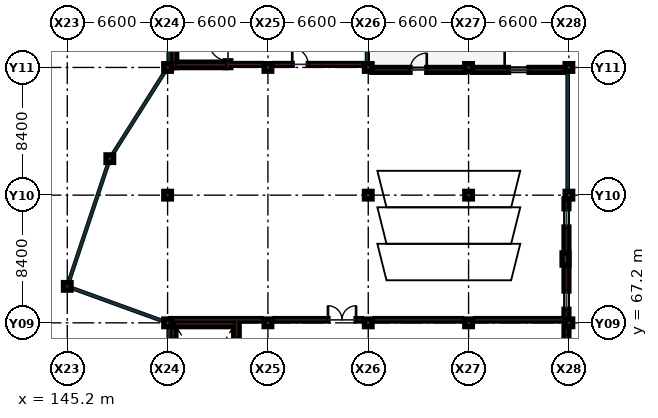
"""IFC4 building model, lengths in metres.
Left out: names, types, materials, properties, quantities, classifications, styles, units other than length and angle.
Written with IfcOpenShell. Run it as: python <this file> out.ifc"""

import sys

from ifc_helpers import new_model, si_unit, direction, frame, frame_2d, origin, origin_2d, place, context, subcontext, project, spatial, rectangle, extrude, element, fill, save


model = new_model("IFC4")
c1 = context("Model", 3, precision=1e-05, world=origin(), true_north=direction((0.0, 1.0)))
c2 = subcontext(c1, "Body", "Model", "MODEL_VIEW")
j1 = project(units=[si_unit("LENGTHUNIT", "METRE"), si_unit("PLANEANGLEUNIT", "RADIAN")], contexts=[c1])
p1 = place(None, origin())
s1 = spatial("IfcSite", under=j1, at=p1, CompositionType="ELEMENT")
p2 = place(p1, origin())
s2 = spatial("IfcBuilding", under=s1, at=p2, CompositionType="ELEMENT")
p3 = place(p2, frame((0.0, 0.0, 9.9)))
s3 = spatial("IfcBuildingStorey", under=s2, at=p3, CompositionType="ELEMENT", Elevation=9.9)
for number, where, z_axis, x_axis in (
    (1, (151.8, 67.2, 0.0), (0.0, 0.0, 1.0), (1.0, 0.0, 0.0)),
    (2, (151.8, 75.6, 0.0), (0.0, 0.0, 1.0), (1.0, 0.0, 0.0)),
    (3, (151.8, 84.0, 0.0), (0.0, 0.0, 1.0), (1.0, 0.0, 0.0)),
    (4, (158.4, 67.2, 0.0), (0.0, 0.0, 1.0), (1.0, 0.0, 0.0)),
    (5, (158.4, 84.0, 0.0), (0.0, 0.0, 1.0), (1.0, 0.0, 0.0)),
    (6, (165.0, 67.2, 0.0), (0.0, 0.0, 1.0), (1.0, 0.0, 0.0)),
    (7, (165.0, 75.6, 0.0), (0.0, 0.0, 1.0), (1.0, 0.0, 0.0)),
    (8, (165.0, 84.0, 0.0), (0.0, 0.0, 1.0), (1.0, 0.0, 0.0)),
    (9, (171.6, 67.2, 0.0), (0.0, 0.0, 1.0), (1.0, 0.0, 0.0)),
    (10, (171.6, 75.6, 0.0), (0.0, 0.0, 1.0), (1.0, 0.0, 0.0)),
    (11, (171.6, 84.0, 0.0), (0.0, 0.0, 1.0), (1.0, 0.0, 0.0)),
    (12, (178.2, 67.2, 0.0), (0.0, 0.0, 1.0), (1.0, 0.0, 0.0)),
    (13, (178.2, 75.6, 0.0), (0.0, 0.0, 1.0), (1.0, 0.0, 0.0)),
    (14, (178.2, 84.0, 0.0), (0.0, 0.0, 1.0), (1.0, 0.0, 0.0)),
    (15, (145.2, 69.6, 0.0), (0.0, 0.0, 1.0), (1.0, 0.0, 0.0)),
    (16, (148.0, 78.0, 0.0), (0.0, 0.0, 1.0), (1.0, 0.0, 0.0)),
):
    element("IfcColumn", number, at=place(p3, frame(where, z_axis=z_axis, x_axis=x_axis)), inside=s3, PredefinedType="COLUMN", context=c2, shape_type="SweptSolid", body=[
        extrude(rectangle(XDim=0.5, YDim=0.5, at=origin_2d()), origin(), (0.0, 0.0, 1.0), 4.5),
    ])
p4 = place(p3, frame((177.975, 71.4, 0.0), z_axis=(0.0, 0.0, 1.0), x_axis=(1.0, 0.0, 0.0)))
e17 = element("IfcColumn", 17, at=p4, inside=s3, PredefinedType="PILASTER", context=c2, shape_type="SweptSolid", body=[
    extrude(rectangle(XDim=0.45, YDim=0.8, at=origin_2d()), origin(), (0.0, 0.0, 1.0), 4.5),
])
p5 = place(p3, frame((152.0, 67.4, 0.0), z_axis=(0.0, 0.0, 1.0), x_axis=(1.0, 0.0, 0.0)))
e18 = element("IfcWall", 18, at=p5, inside=s3, PredefinedType="PARTITIONING", context=c2, shape_type="SweptSolid", body=[
    extrude(rectangle(XDim=5.95, YDim=0.16, at=frame_2d((2.975, 0.0))), origin(), (0.0, 0.0, 1.0), 3.49),
])
p6 = place(p3, frame((158.85, 67.4, 0.0), z_axis=(0.0, 0.0, 1.0), x_axis=(1.0, 0.0, 0.0)))
e19 = element("IfcWall", 19, at=p6, inside=s3, PredefinedType="PARTITIONING", context=c2, shape_type="SweptSolid", body=[
    extrude(rectangle(XDim=5.7, YDim=0.16, at=frame_2d((2.85, 0.0))), origin(), (0.0, 0.0, 1.0), 3.49),
])
p7 = place(p6, frame((3.5, 0.0, 0.0)))
e20 = element("IfcOpeningElement", 20, at=p7, cuts=e19, PredefinedType="OPENING", context=c2, shape_type="SweptSolid", body=[
    extrude(rectangle(XDim=1.85, YDim=2.25, at=frame_2d((0.925, 1.125))), frame((0.0, 0.09, 0.0), z_axis=(0.0, -1.0, 0.0), x_axis=(1.0, 0.0, 0.0)), (0.0, 0.0, 1.0), 0.18),
])
p8 = place(p3, frame((165.45, 67.4, 0.0), z_axis=(0.0, 0.0, 1.0), x_axis=(1.0, 0.0, 0.0)))
e21 = element("IfcWall", 21, at=p8, inside=s3, PredefinedType="PARTITIONING", context=c2, shape_type="SweptSolid", body=[
    extrude(rectangle(XDim=5.7, YDim=0.16, at=frame_2d((2.85, 0.0))), origin(), (0.0, 0.0, 1.0), 3.49),
])
p9 = place(p3, frame((172.05, 67.4, 0.0), z_axis=(0.0, 0.0, 1.0), x_axis=(1.0, 0.0, 0.0)))
e22 = element("IfcWall", 22, at=p9, inside=s3, PredefinedType="PARTITIONING", context=c2, shape_type="SweptSolid", body=[
    extrude(rectangle(XDim=5.83, YDim=0.16, at=frame_2d((2.915, 0.0))), origin(), (0.0, 0.0, 1.0), 3.49),
])
p10 = place(p3, frame((155.8, 84.2, 0.0), z_axis=(0.0, 0.0, 1.0), x_axis=(1.0, 0.0, 0.0)))
e23 = element("IfcWall", 23, at=p10, inside=s3, PredefinedType="PARTITIONING", context=c2, shape_type="SweptSolid", body=[
    extrude(rectangle(XDim=2.15, YDim=0.12, at=frame_2d((1.075, 0.0))), origin(), (0.0, 0.0, 1.0), 3.49),
])
p11 = place(p3, frame((158.85, 84.2, 0.0), z_axis=(0.0, 0.0, 1.0), x_axis=(1.0, 0.0, 0.0)))
e24 = element("IfcWall", 24, at=p11, inside=s3, PredefinedType="PARTITIONING", context=c2, shape_type="SweptSolid", body=[
    extrude(rectangle(XDim=5.83, YDim=0.12, at=frame_2d((2.915, 0.0))), origin(), (0.0, 0.0, 1.0), 3.49),
])
p12 = place(p11, frame((1.15, 0.0, 0.0)))
e25 = element("IfcOpeningElement", 25, at=p12, cuts=e24, PredefinedType="OPENING", context=c2, shape_type="SweptSolid", body=[
    extrude(rectangle(XDim=1.05, YDim=2.15, at=frame_2d((0.525, 1.075))), frame((0.0, 0.07, 0.0), z_axis=(0.0, -1.0, 0.0), x_axis=(1.0, 0.0, 0.0)), (0.0, 0.0, 1.0), 0.14),
])
p13 = place(p3, frame((171.355, 83.84, 0.0), z_axis=(0.0, 0.0, 1.0), x_axis=(-1.0, 0.0, 0.0)))
e26 = element("IfcWall", 26, at=p13, inside=s3, PredefinedType="SOLIDWALL", context=c2, shape_type="SweptSolid", body=[
    extrude(rectangle(XDim=6.11, YDim=0.32, at=frame_2d((3.055, 0.0))), origin(), (0.0, 0.0, 1.0), 3.625),
])
p14 = place(p13, frame((2.505, 0.0, 0.0)))
e27 = element("IfcOpeningElement", 27, at=p14, cuts=e26, PredefinedType="OPENING", context=c2, shape_type="SweptSolid", body=[
    extrude(rectangle(XDim=1.1, YDim=2.2, at=frame_2d((0.55, 1.1))), frame((0.0, 0.17, 0.0), z_axis=(0.0, -1.0, 0.0), x_axis=(1.0, 0.0, 0.0)), (0.0, 0.0, 1.0), 0.34),
])
p15 = place(p3, frame((178.04, 59.195, 0.0), z_axis=(0.0, 0.0, 1.0), x_axis=(0.0, 1.0, 0.0)))
e28 = element("IfcWall", 28, at=p15, inside=s3, PredefinedType="SOLIDWALL", context=c2, shape_type="SweptSolid", body=[
    extrude(rectangle(XDim=7.76, YDim=0.32, at=frame_2d((3.88, 0.0))), origin(), (0.0, 0.0, 1.0), 3.625),
])
p16 = place(p15, frame((0.65, 0.0, 0.95)))
e29 = element("IfcOpeningElement", 29, at=p16, cuts=e28, PredefinedType="OPENING", context=c2, shape_type="SweptSolid", body=[
    extrude(rectangle(XDim=1.2, YDim=1.5, at=frame_2d((0.6, 0.75))), frame((0.0, 0.17, 0.0), z_axis=(0.0, -1.0, 0.0), x_axis=(1.0, 0.0, 0.0)), (0.0, 0.0, 1.0), 0.34),
])
p17 = place(p15, frame((5.91, 0.0, 0.95)))
e30 = element("IfcOpeningElement", 30, at=p17, cuts=e28, PredefinedType="OPENING", context=c2, shape_type="SweptSolid", body=[
    extrude(rectangle(XDim=1.2, YDim=1.5, at=frame_2d((0.6, 0.75))), frame((0.0, 0.17, 0.0), z_axis=(0.0, -1.0, 0.0), x_axis=(1.0, 0.0, 0.0)), (0.0, 0.0, 1.0), 0.34),
])
p18 = place(p3, frame((178.04, 67.445, 0.0), z_axis=(0.0, 0.0, 1.0), x_axis=(0.0, 1.0, 0.0)))
e31 = element("IfcWall", 31, at=p18, inside=s3, PredefinedType="SOLIDWALL", context=c2, shape_type="SweptSolid", body=[
    extrude(rectangle(XDim=7.91, YDim=0.32, at=frame_2d((3.955, 0.0))), origin(), (0.0, 0.0, 1.0), 3.625),
])
p19 = place(p18, frame((0.65, 0.0, 0.95)))
e32 = element("IfcOpeningElement", 32, at=p19, cuts=e31, PredefinedType="OPENING", context=c2, shape_type="SweptSolid", body=[
    extrude(rectangle(XDim=1.2, YDim=1.5, at=frame_2d((0.6, 0.75))), frame((0.0, 0.17, 0.0), z_axis=(0.0, -1.0, 0.0), x_axis=(1.0, 0.0, 0.0)), (0.0, 0.0, 1.0), 0.34),
])
p20 = place(p18, frame((6.06, 0.0, 0.95)))
e33 = element("IfcOpeningElement", 33, at=p20, cuts=e31, PredefinedType="OPENING", context=c2, shape_type="SweptSolid", body=[
    extrude(rectangle(XDim=1.2, YDim=1.5, at=frame_2d((0.6, 0.75))), frame((0.0, 0.17, 0.0), z_axis=(0.0, -1.0, 0.0), x_axis=(1.0, 0.0, 0.0)), (0.0, 0.0, 1.0), 0.34),
])
p21 = place(p3, frame((177.955, 83.84, 0.0), z_axis=(0.0, 0.0, 1.0), x_axis=(-1.0, 0.0, 0.0)))
e34 = element("IfcWall", 34, at=p21, inside=s3, PredefinedType="SOLIDWALL", context=c2, shape_type="SweptSolid", body=[
    extrude(rectangle(XDim=6.11, YDim=0.32, at=frame_2d((3.055, 0.0))), origin(), (0.0, 0.0, 1.0), 3.625),
])
p22 = place(p21, frame((2.38, 0.0, 0.95)))
e35 = element("IfcOpeningElement", 35, at=p22, cuts=e34, PredefinedType="OPENING", context=c2, shape_type="SweptSolid", body=[
    extrude(rectangle(XDim=1.35, YDim=1.55, at=frame_2d((0.675, 0.775))), frame((0.0, 0.17, 0.0), z_axis=(0.0, -1.0, 0.0), x_axis=(1.0, 0.0, 0.0)), (0.0, 0.0, 1.0), 0.34),
])
p23 = place(p3, frame((152.17, 58.69, 0.0), z_axis=(0.0, 0.0, 1.0), x_axis=(0.0, 1.0, 0.0)))
e36 = element("IfcWall", 36, at=p23, inside=s3, PredefinedType="SHEAR", context=c2, shape_type="SweptSolid", body=[
    extrude(rectangle(XDim=8.62, YDim=0.36, at=frame_2d((4.31, 0.0))), origin(), (0.0, 0.0, 1.0), 4.24),
])
p24 = place(p3, frame((156.33, 58.69, 0.0), z_axis=(0.0, 0.0, 1.0), x_axis=(0.0, 1.0, 0.0)))
e37 = element("IfcWall", 37, at=p24, inside=s3, PredefinedType="SHEAR", context=c2, shape_type="SweptSolid", body=[
    extrude(rectangle(XDim=8.62, YDim=0.36, at=frame_2d((4.31, 0.0))), origin(), (0.0, 0.0, 1.0), 4.24),
])
p25 = place(p24, frame((0.45, 0.0, 0.0)))
e38 = element("IfcOpeningElement", 38, at=p25, cuts=e37, PredefinedType="OPENING", context=c2, shape_type="SweptSolid", body=[
    extrude(rectangle(XDim=1.25, YDim=2.15, at=frame_2d((0.625, 1.075))), frame((0.0, 0.19, 0.0), z_axis=(0.0, -1.0, 0.0), x_axis=(1.0, 0.0, 0.0)), (0.0, 0.0, 1.0), 0.38),
])
p26 = place(p3, frame((152.35, 67.13, 0.0), z_axis=(0.0, 0.0, 1.0), x_axis=(1.0, 0.0, 0.0)))
e39 = element("IfcWall", 39, at=p26, inside=s3, PredefinedType="SHEAR", context=c2, shape_type="SweptSolid", body=[
    extrude(rectangle(XDim=3.8, YDim=0.36, at=frame_2d((1.9, 0.0))), origin(), (0.0, 0.0, 1.0), 4.24),
])
p27 = place(p3, frame((152.22, 83.99, 0.0), z_axis=(0.0, 0.0, 1.0), x_axis=(0.0, 1.0, 0.0)))
e40 = element("IfcWall", 40, at=p27, inside=s3, PredefinedType="SHEAR", context=c2, shape_type="SweptSolid", body=[
    extrude(rectangle(XDim=8.17, YDim=0.36, at=frame_2d((4.085, 0.0))), origin(), (0.0, 0.0, 1.0), 4.24),
])
p28 = place(p3, frame((155.78, 83.99, 0.0), z_axis=(0.0, 0.0, 1.0), x_axis=(0.0, 1.0, 0.0)))
e41 = element("IfcWall", 41, at=p28, inside=s3, PredefinedType="SHEAR", context=c2, shape_type="SweptSolid", body=[
    extrude(rectangle(XDim=8.17, YDim=0.36, at=frame_2d((4.085, 0.0))), origin(), (0.0, 0.0, 1.0), 4.24),
])
p29 = place(p28, frame((0.45, 0.0, 0.0)))
e42 = element("IfcOpeningElement", 42, at=p29, cuts=e41, PredefinedType="OPENING", context=c2, shape_type="SweptSolid", body=[
    extrude(rectangle(XDim=1.25, YDim=2.15, at=frame_2d((0.625, 1.075))), frame((0.0, 0.19, 0.0), z_axis=(0.0, -1.0, 0.0), x_axis=(1.0, 0.0, 0.0)), (0.0, 0.0, 1.0), 0.38),
])
p30 = place(p3, frame((152.4, 84.17, 0.0), z_axis=(0.0, 0.0, 1.0), x_axis=(1.0, 0.0, 0.0)))
e43 = element("IfcWall", 43, at=p30, inside=s3, PredefinedType="SHEAR", context=c2, shape_type="SweptSolid", body=[
    extrude(rectangle(XDim=3.2, YDim=0.36, at=frame_2d((1.6, 0.0))), origin(), (0.0, 0.0, 1.0), 4.24),
])
p31 = place(p7, origin())
e44 = element("IfcDoor", 44, at=p31, inside=s3, OperationType="DOUBLE_DOOR_SINGLE_SWING", PredefinedType="DOOR", context=c2, shape_type="SweptSolid", body=[
    extrude(rectangle(XDim=1.85, YDim=2.25, at=frame_2d((0.925, 1.125))), frame((0.0, 0.025, 0.0), z_axis=(0.0, -1.0, 0.0), x_axis=(1.0, 0.0, 0.0)), (0.0, 0.0, 1.0), 0.05),
])
fill(e20, e44)
p32 = place(p12, origin())
e45 = element("IfcDoor", 45, at=p32, inside=s3, OperationType="SINGLE_SWING_LEFT", PredefinedType="DOOR", context=c2, shape_type="SweptSolid", body=[
    extrude(rectangle(XDim=1.05, YDim=2.15, at=frame_2d((0.525, 1.075))), frame((0.0, 0.025, 0.0), z_axis=(0.0, -1.0, 0.0), x_axis=(1.0, 0.0, 0.0)), (0.0, 0.0, 1.0), 0.05),
])
fill(e25, e45)
p33 = place(p14, frame((1.1, 0.0, 0.0), z_axis=(0.0, 0.0, 1.0), x_axis=(-1.0, 0.0, 0.0)))
e46 = element("IfcDoor", 46, at=p33, inside=s3, OperationType="SINGLE_SWING_LEFT", PredefinedType="DOOR", context=c2, shape_type="SweptSolid", body=[
    extrude(rectangle(XDim=1.1, YDim=2.2, at=frame_2d((0.55, 1.1))), frame((0.0, 0.025, 0.0), z_axis=(0.0, -1.0, 0.0), x_axis=(1.0, 0.0, 0.0)), (0.0, 0.0, 1.0), 0.05),
])
fill(e27, e46)
p34 = place(p17, origin())
e47 = element("IfcWindow", 47, at=p34, inside=s3, PartitioningType="SINGLE_PANEL", PredefinedType="WINDOW", context=c2, shape_type="SweptSolid", body=[
    extrude(rectangle(XDim=1.2, YDim=1.5, at=frame_2d((0.6, 0.75))), frame((0.0, 0.03, 0.0), z_axis=(0.0, -1.0, 0.0), x_axis=(1.0, 0.0, 0.0)), (0.0, 0.0, 1.0), 0.06),
])
fill(e30, e47)
p35 = place(p19, origin())
e48 = element("IfcWindow", 48, at=p35, inside=s3, PartitioningType="SINGLE_PANEL", PredefinedType="WINDOW", context=c2, shape_type="SweptSolid", body=[
    extrude(rectangle(XDim=1.2, YDim=1.5, at=frame_2d((0.6, 0.75))), frame((0.0, 0.03, 0.0), z_axis=(0.0, -1.0, 0.0), x_axis=(1.0, 0.0, 0.0)), (0.0, 0.0, 1.0), 0.06),
])
fill(e32, e48)
p36 = place(p20, origin())
e49 = element("IfcWindow", 49, at=p36, inside=s3, PartitioningType="SINGLE_PANEL", PredefinedType="WINDOW", context=c2, shape_type="SweptSolid", body=[
    extrude(rectangle(XDim=1.2, YDim=1.5, at=frame_2d((0.6, 0.75))), frame((0.0, 0.03, 0.0), z_axis=(0.0, -1.0, 0.0), x_axis=(1.0, 0.0, 0.0)), (0.0, 0.0, 1.0), 0.06),
])
fill(e33, e49)
p37 = place(p22, origin())
e50 = element("IfcWindow", 50, at=p37, inside=s3, PartitioningType="SINGLE_PANEL", PredefinedType="WINDOW", context=c2, shape_type="SweptSolid", body=[
    extrude(rectangle(XDim=1.35, YDim=1.55, at=frame_2d((0.675, 0.775))), frame((0.0, 0.03, 0.0), z_axis=(0.0, -1.0, 0.0), x_axis=(1.0, 0.0, 0.0)), (0.0, 0.0, 1.0), 0.06),
])
fill(e35, e50)
p38 = place(p29, origin())
e51 = element("IfcDoor", 51, at=p38, inside=s3, OperationType="SINGLE_SWING_RIGHT", PredefinedType="DOOR", context=c2, shape_type="SweptSolid", body=[
    extrude(rectangle(XDim=1.25, YDim=2.15, at=frame_2d((0.625, 1.075))), frame((0.0, 0.025, 0.0), z_axis=(0.0, -1.0, 0.0), x_axis=(1.0, 0.0, 0.0)), (0.0, 0.0, 1.0), 0.05),
])
fill(e42, e51)
save(model, sys.argv[1])
